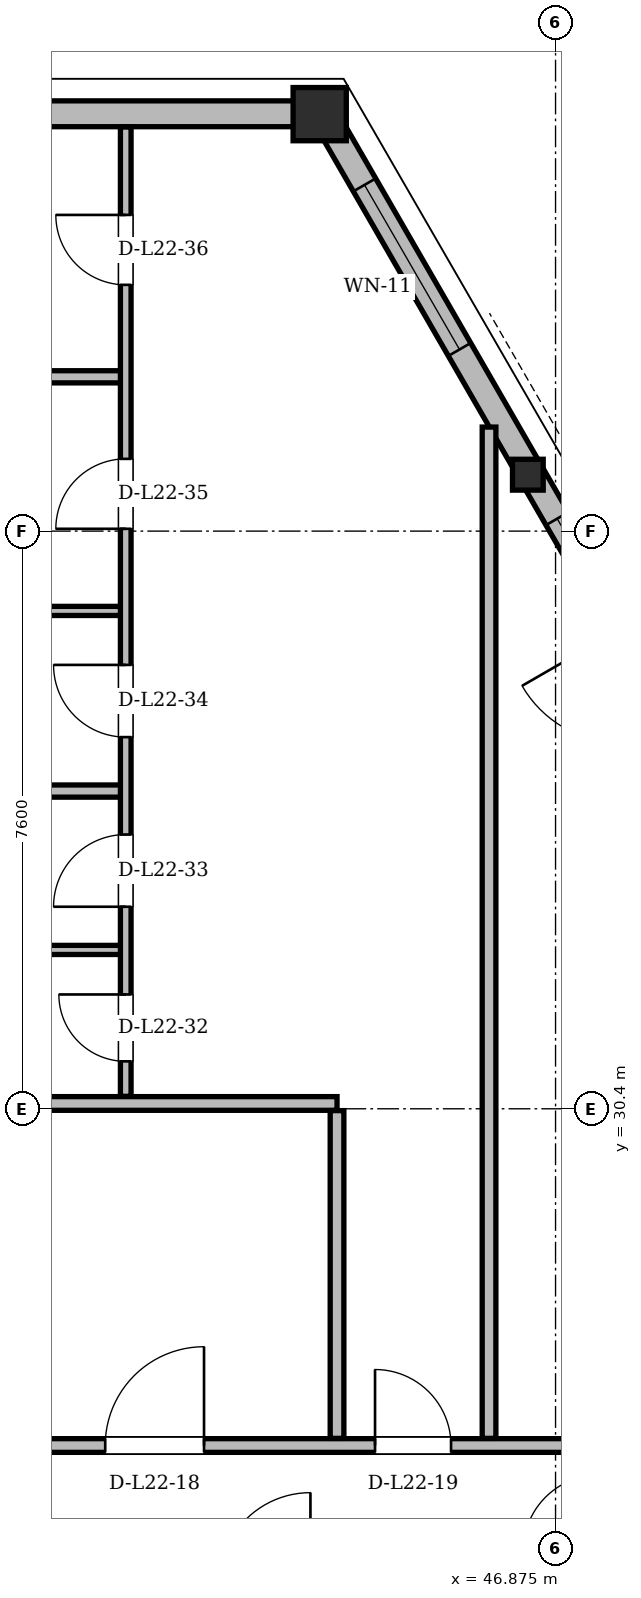
"""IFC4 building model, lengths in metres.
Left out: names, types, materials, properties, quantities, classifications, styles, units other than length and angle.
Written with IfcOpenShell. Run it as: python <this file> out.ifc"""

import sys

from ifc_helpers import new_model, si_unit, direction, frame, frame_2d, origin, origin_2d, place, context, subcontext, project, spatial, rectangle, hollow_rectangle, i_section, extrude, element, fill, save


model = new_model("IFC4")
c1 = context("Model", 3, precision=1e-05, world=origin(), true_north=direction((0.0, 1.0)))
c2 = subcontext(c1, "Body", "Model", "MODEL_VIEW")
j1 = project(units=[si_unit("LENGTHUNIT", "METRE"), si_unit("PLANEANGLEUNIT", "RADIAN")], contexts=[c1])
p1 = place(None, origin())
s1 = spatial("IfcSite", under=j1, at=p1, CompositionType="ELEMENT")
p2 = place(p1, origin())
s2 = spatial("IfcBuilding", under=s1, at=p2, CompositionType="ELEMENT")
p3 = place(p2, frame((0.0, 0.0, 86.1)))
s3 = spatial("IfcBuildingStorey", under=s2, at=p3, CompositionType="ELEMENT", Elevation=86.1)
p4 = place(p3, frame((43.821, 43.49, 0.004), z_axis=(-0.027523634775, -0.002650424089, 0.999617639291), x_axis=(0.095852900965, -0.995395510024, 0.0)))
e1 = element("IfcColumn", 1, at=p4, inside=s3, PredefinedType="COLUMN", context=c2, shape_type="SweptSolid", body=[
    extrude(hollow_rectangle(XDim=0.7, YDim=0.7, WallThickness=0.055, at=origin_2d()), origin(), (0.0, 0.0, 1.0), 3.593),
])
p5 = place(p3, frame((46.557, 38.753, 0.004), z_axis=(-0.025621714131, -0.005844741155, 0.999654623741), x_axis=(0.222403463218, -0.974954716666, 0.0)))
e2 = element("IfcColumn", 2, at=p5, inside=s3, PredefinedType="COLUMN", context=c2, shape_type="SweptSolid", body=[
    extrude(i_section(OverallWidth=0.404, OverallDepth=0.406, WebThickness=0.027, FlangeThickness=0.044, at=origin_2d()), origin(), (0.0, 0.0, 1.0), 3.592),
])
p6 = place(p3, frame((60.917, 13.879, 0.0), z_axis=(0.0, 0.0, 1.0), x_axis=(-0.49999956034, 0.866025657622, 0.0)))
e3 = element("IfcWall", 3, at=p6, inside=s3, PredefinedType="SOLIDWALL", context=c2, shape_type="SweptSolid", body=[
    extrude(rectangle(XDim=34.192, YDim=0.34, at=frame_2d((17.096, 0.0))), origin(), (0.0, 0.0, 1.0), 2.578),
])
p7 = place(p6, frame((6.579, 0.0, 0.0)))
e4 = element("IfcOpeningElement", 4, at=p7, cuts=e3, PredefinedType="OPENING", context=c2, shape_type="SweptSolid", body=[
    extrude(rectangle(XDim=1.5, YDim=2.2, at=frame_2d((0.75, 1.1))), frame((0.0, 0.17, 0.0), z_axis=(0.0, -1.0, 0.0), x_axis=(1.0, 0.0, 0.0)), (0.0, 0.0, 1.0), 0.34),
])
p8 = place(p6, frame((24.868, 0.0, 0.0)))
e5 = element("IfcOpeningElement", 5, at=p8, cuts=e3, PredefinedType="OPENING", context=c2, shape_type="SweptSolid", body=[
    extrude(rectangle(XDim=1.5, YDim=2.2, at=frame_2d((0.75, 1.1))), frame((0.0, 0.17, 0.0), z_axis=(0.0, -1.0, 0.0), x_axis=(1.0, 0.0, 0.0)), (0.0, 0.0, 1.0), 0.34),
])
p9 = place(p6, frame((1.584, 0.0, 0.85)))
e6 = element("IfcOpeningElement", 6, at=p9, cuts=e3, PredefinedType="OPENING", context=c2, shape_type="SweptSolid", body=[
    extrude(rectangle(XDim=1.2, YDim=1.48, at=frame_2d((0.6, 0.74))), frame((0.0, 0.17, 0.0), z_axis=(0.0, -1.0, 0.0), x_axis=(1.0, 0.0, 0.0)), (0.0, 0.0, 1.0), 0.34),
])
p10 = place(p6, frame((30.611, 0.0, 0.85)))
e7 = element("IfcOpeningElement", 7, at=p10, cuts=e3, PredefinedType="OPENING", context=c2, shape_type="SweptSolid", body=[
    extrude(rectangle(XDim=2.5, YDim=1.618, at=frame_2d((1.25, 0.809))), frame((0.0, 0.17, 0.0), z_axis=(0.0, -1.0, 0.0), x_axis=(1.0, 0.0, 0.0)), (0.0, 0.0, 1.0), 0.34),
])
p11 = place(p6, frame((20.17, 0.0, 0.85)))
e8 = element("IfcOpeningElement", 8, at=p11, cuts=e3, PredefinedType="OPENING", context=c2, shape_type="SweptSolid", body=[
    extrude(rectangle(XDim=2.4, YDim=1.618, at=frame_2d((1.2, 0.809))), frame((0.0, 0.17, 0.0), z_axis=(0.0, -1.0, 0.0), x_axis=(1.0, 0.0, 0.0)), (0.0, 0.0, 1.0), 0.34),
])
p12 = place(p6, frame((26.841, 0.0, 0.85)))
e9 = element("IfcOpeningElement", 9, at=p12, cuts=e3, PredefinedType="OPENING", context=c2, shape_type="SweptSolid", body=[
    extrude(rectangle(XDim=1.2, YDim=1.48, at=frame_2d((0.6, 0.74))), frame((0.0, 0.17, 0.0), z_axis=(0.0, -1.0, 0.0), x_axis=(1.0, 0.0, 0.0)), (0.0, 0.0, 1.0), 0.34),
])
p13 = place(p6, frame((15.279, 0.0, 0.85)))
e10 = element("IfcOpeningElement", 10, at=p13, cuts=e3, PredefinedType="OPENING", context=c2, shape_type="SweptSolid", body=[
    extrude(rectangle(XDim=1.2, YDim=1.48, at=frame_2d((0.6, 0.74))), frame((0.0, 0.17, 0.0), z_axis=(0.0, -1.0, 0.0), x_axis=(1.0, 0.0, 0.0)), (0.0, 0.0, 1.0), 0.34),
])
p14 = place(p6, frame((17.873, 0.0, 0.85)))
e11 = element("IfcOpeningElement", 11, at=p14, cuts=e3, PredefinedType="OPENING", context=c2, shape_type="SweptSolid", body=[
    extrude(rectangle(XDim=1.2, YDim=1.48, at=frame_2d((0.6, 0.74))), frame((0.0, 0.17, 0.0), z_axis=(0.0, -1.0, 0.0), x_axis=(1.0, 0.0, 0.0)), (0.0, 0.0, 1.0), 0.34),
])
p15 = place(p3, frame((43.821, 43.49, 0.0), z_axis=(0.0, 0.0, 1.0), x_axis=(-1.0, 0.0, 0.0)))
e12 = element("IfcWall", 12, at=p15, inside=s3, PredefinedType="SOLIDWALL", context=c2, shape_type="SweptSolid", body=[
    extrude(rectangle(XDim=12.643, YDim=0.34, at=frame_2d((6.321, 0.0))), origin(), (0.0, 0.0, 1.0), 2.578),
])
p16 = place(p15, frame((4.799, 0.0, 0.85)))
e13 = element("IfcOpeningElement", 13, at=p16, cuts=e12, PredefinedType="OPENING", context=c2, shape_type="SweptSolid", body=[
    extrude(rectangle(XDim=0.9, YDim=1.15, at=frame_2d((0.45, 0.575))), frame((0.0, 0.17, 0.0), z_axis=(0.0, -1.0, 0.0), x_axis=(1.0, 0.0, 0.0)), (0.0, 0.0, 1.0), 0.34),
])
p17 = place(p3, frame((27.55, 25.97, 0.0), z_axis=(0.0, 0.0, 1.0), x_axis=(1.0, 0.0, 0.0)))
e14 = element("IfcWall", 14, at=p17, inside=s3, PredefinedType="PARTITIONING", context=c2, shape_type="SweptSolid", body=[
    extrude(rectangle(XDim=19.9, YDim=0.18, at=frame_2d((9.95, 0.0))), origin(), (0.0, 0.0, 1.0), 2.814),
])
p18 = place(p17, frame((0.425, 0.0, 0.0)))
e15 = element("IfcOpeningElement", 15, at=p18, cuts=e14, PredefinedType="OPENING", context=c2, shape_type="SweptSolid", body=[
    extrude(rectangle(XDim=1.0, YDim=2.18, at=frame_2d((0.5, 1.09))), frame((0.0, 0.09, 0.0), z_axis=(0.0, -1.0, 0.0), x_axis=(1.0, 0.0, 0.0)), (0.0, 0.0, 1.0), 0.18),
])
p19 = place(p17, frame((4.222, 0.0, 0.0)))
e16 = element("IfcOpeningElement", 16, at=p19, cuts=e14, PredefinedType="OPENING", context=c2, shape_type="SweptSolid", body=[
    extrude(rectangle(XDim=1.0, YDim=2.18, at=frame_2d((0.5, 1.09))), frame((0.0, 0.09, 0.0), z_axis=(0.0, -1.0, 0.0), x_axis=(1.0, 0.0, 0.0)), (0.0, 0.0, 1.0), 0.18),
])
p20 = place(p17, frame((13.4, 0.0, 0.0)))
e17 = element("IfcOpeningElement", 17, at=p20, cuts=e14, PredefinedType="OPENING", context=c2, shape_type="SweptSolid", body=[
    extrude(rectangle(XDim=1.3, YDim=2.2, at=frame_2d((0.65, 1.1))), frame((0.0, 0.09, 0.0), z_axis=(0.0, -1.0, 0.0), x_axis=(1.0, 0.0, 0.0)), (0.0, 0.0, 1.0), 0.18),
])
p21 = place(p17, frame((16.95, 0.0, 0.0)))
e18 = element("IfcOpeningElement", 18, at=p21, cuts=e14, PredefinedType="OPENING", context=c2, shape_type="SweptSolid", body=[
    extrude(rectangle(XDim=1.0, YDim=2.18, at=frame_2d((0.5, 1.09))), frame((0.0, 0.09, 0.0), z_axis=(0.0, -1.0, 0.0), x_axis=(1.0, 0.0, 0.0)), (0.0, 0.0, 1.0), 0.18),
])
p22 = place(p3, frame((39.2, 30.47, 0.0), z_axis=(0.0, 0.0, 1.0), x_axis=(1.0, 0.0, 0.0)))
e19 = element("IfcWall", 19, at=p22, inside=s3, PredefinedType="PARTITIONING", context=c2, shape_type="SweptSolid", body=[
    extrude(rectangle(XDim=4.8, YDim=0.18, at=frame_2d((2.4, 0.0))), origin(), (0.0, 0.0, 1.0), 3.36),
])
p23 = place(p3, frame((37.95, 32.49, 0.0), z_axis=(0.0, 0.0, 1.0), x_axis=(1.0, 0.0, 0.0)))
e20 = element("IfcWall", 20, at=p23, inside=s3, PredefinedType="PARTITIONING", context=c2, shape_type="SweptSolid", body=[
    extrude(rectangle(XDim=3.27, YDim=0.12, at=frame_2d((1.635, 0.0))), origin(), (0.0, 0.0, 1.0), 3.36),
])
p24 = place(p3, frame((37.95, 34.58, 0.0), z_axis=(0.0, 0.0, 1.0), x_axis=(1.0, 0.0, 0.0)))
e21 = element("IfcWall", 21, at=p24, inside=s3, PredefinedType="PARTITIONING", context=c2, shape_type="SweptSolid", body=[
    extrude(rectangle(XDim=3.27, YDim=0.16, at=frame_2d((1.635, 0.0))), origin(), (0.0, 0.0, 1.0), 3.36),
])
p25 = place(p3, frame((37.95, 36.95, 0.0), z_axis=(0.0, 0.0, 1.0), x_axis=(1.0, 0.0, 0.0)))
e22 = element("IfcWall", 22, at=p25, inside=s3, PredefinedType="PARTITIONING", context=c2, shape_type="SweptSolid", body=[
    extrude(rectangle(XDim=3.27, YDim=0.12, at=frame_2d((1.635, 0.0))), origin(), (0.0, 0.0, 1.0), 3.36),
])
p26 = place(p3, frame((37.95, 40.03, 0.0), z_axis=(0.0, 0.0, 1.0), x_axis=(1.0, 0.0, 0.0)))
e23 = element("IfcWall", 23, at=p26, inside=s3, PredefinedType="PARTITIONING", context=c2, shape_type="SweptSolid", body=[
    extrude(rectangle(XDim=3.27, YDim=0.16, at=frame_2d((1.635, 0.0))), origin(), (0.0, 0.0, 1.0), 3.36),
])
p27 = place(p3, frame((41.22, 30.564, 0.0), z_axis=(0.0, 0.0, 1.0), x_axis=(0.0, 1.0, 0.0)))
e24 = element("IfcWall", 24, at=p27, inside=s3, PredefinedType="PARTITIONING", context=c2, shape_type="SweptSolid", body=[
    extrude(rectangle(XDim=12.752, YDim=0.14, at=frame_2d((6.376, 0.0))), origin(), (0.0, 0.0, 1.0), 3.36),
])
p28 = place(p27, frame((0.46, 0.0, 0.0)))
e25 = element("IfcOpeningElement", 25, at=p28, cuts=e24, PredefinedType="OPENING", context=c2, shape_type="SweptSolid", body=[
    extrude(rectangle(XDim=0.88, YDim=2.08, at=frame_2d((0.44, 1.04))), frame((0.0, 0.07, 0.0), z_axis=(0.0, -1.0, 0.0), x_axis=(1.0, 0.0, 0.0)), (0.0, 0.0, 1.0), 0.14),
])
p29 = place(p27, frame((2.494, 0.0, 0.0)))
e26 = element("IfcOpeningElement", 26, at=p29, cuts=e24, PredefinedType="OPENING", context=c2, shape_type="SweptSolid", body=[
    extrude(rectangle(XDim=0.95, YDim=2.1, at=frame_2d((0.475, 1.05))), frame((0.0, 0.07, 0.0), z_axis=(0.0, -1.0, 0.0), x_axis=(1.0, 0.0, 0.0)), (0.0, 0.0, 1.0), 0.14),
])
p30 = place(p27, frame((4.726, 0.0, 0.0)))
e27 = element("IfcOpeningElement", 27, at=p30, cuts=e24, PredefinedType="OPENING", context=c2, shape_type="SweptSolid", body=[
    extrude(rectangle(XDim=0.95, YDim=2.1, at=frame_2d((0.475, 1.05))), frame((0.0, 0.07, 0.0), z_axis=(0.0, -1.0, 0.0), x_axis=(1.0, 0.0, 0.0)), (0.0, 0.0, 1.0), 0.14),
])
p31 = place(p27, frame((7.467, 0.0, 0.0)))
e28 = element("IfcOpeningElement", 28, at=p31, cuts=e24, PredefinedType="OPENING", context=c2, shape_type="SweptSolid", body=[
    extrude(rectangle(XDim=0.92, YDim=2.12, at=frame_2d((0.46, 1.06))), frame((0.0, 0.07, 0.0), z_axis=(0.0, -1.0, 0.0), x_axis=(1.0, 0.0, 0.0)), (0.0, 0.0, 1.0), 0.14),
])
p32 = place(p27, frame((10.676, 0.0, 0.0)))
e29 = element("IfcOpeningElement", 29, at=p32, cuts=e24, PredefinedType="OPENING", context=c2, shape_type="SweptSolid", body=[
    extrude(rectangle(XDim=0.92, YDim=2.12, at=frame_2d((0.46, 1.06))), frame((0.0, 0.07, 0.0), z_axis=(0.0, -1.0, 0.0), x_axis=(1.0, 0.0, 0.0)), (0.0, 0.0, 1.0), 0.14),
])
p33 = place(p3, frame((44.0, 26.064, 0.0), z_axis=(0.0, 0.0, 1.0), x_axis=(0.0, 1.0, 0.0)))
e30 = element("IfcWall", 30, at=p33, inside=s3, PredefinedType="PARTITIONING", context=c2, shape_type="SweptSolid", body=[
    extrude(rectangle(XDim=4.312, YDim=0.18, at=frame_2d((2.156, 0.0))), origin(), (0.0, 0.0, 1.0), 2.946),
])
p34 = place(p3, frame((46.0, 26.064, 0.0), z_axis=(0.0, 0.0, 1.0), x_axis=(0.0, 1.0, 0.0)))
e31 = element("IfcWall", 31, at=p34, inside=s3, PredefinedType="PARTITIONING", context=c2, shape_type="SweptSolid", body=[
    extrude(rectangle(XDim=13.305, YDim=0.18, at=frame_2d((6.652, 0.0))), origin(), (0.0, 0.0, 1.0), 2.578),
])
p35 = place(p10, origin())
e32 = element("IfcWindow", 32, at=p35, inside=s3, PartitioningType="SINGLE_PANEL", PredefinedType="WINDOW", context=c2, shape_type="SweptSolid", body=[
    extrude(rectangle(XDim=2.5, YDim=1.618, at=frame_2d((1.25, 0.809))), frame((0.0, 0.03, 0.0), z_axis=(0.0, -1.0, 0.0), x_axis=(1.0, 0.0, 0.0)), (0.0, 0.0, 1.0), 0.06),
])
fill(e7, e32)
p36 = place(p12, origin())
e33 = element("IfcWindow", 33, at=p36, inside=s3, PartitioningType="SINGLE_PANEL", PredefinedType="WINDOW", context=c2, shape_type="SweptSolid", body=[
    extrude(rectangle(XDim=1.2, YDim=1.48, at=frame_2d((0.6, 0.74))), frame((0.0, 0.03, 0.0), z_axis=(0.0, -1.0, 0.0), x_axis=(1.0, 0.0, 0.0)), (0.0, 0.0, 1.0), 0.06),
])
fill(e9, e33)
p37 = place(p20, origin())
e34 = element("IfcDoor", 34, at=p37, inside=s3, OperationType="SINGLE_SWING_RIGHT", PredefinedType="DOOR", context=c2, shape_type="SweptSolid", body=[
    extrude(rectangle(XDim=1.3, YDim=2.2, at=frame_2d((0.65, 1.1))), frame((0.0, 0.025, 0.0), z_axis=(0.0, -1.0, 0.0), x_axis=(1.0, 0.0, 0.0)), (0.0, 0.0, 1.0), 0.05),
])
fill(e17, e34)
p38 = place(p21, origin())
e35 = element("IfcDoor", 35, at=p38, inside=s3, OperationType="SINGLE_SWING_LEFT", PredefinedType="DOOR", context=c2, shape_type="SweptSolid", body=[
    extrude(rectangle(XDim=1.0, YDim=2.18, at=frame_2d((0.5, 1.09))), frame((0.0, 0.025, 0.0), z_axis=(0.0, -1.0, 0.0), x_axis=(1.0, 0.0, 0.0)), (0.0, 0.0, 1.0), 0.05),
])
fill(e18, e35)
p39 = place(p28, origin())
e36 = element("IfcDoor", 36, at=p39, inside=s3, OperationType="SINGLE_SWING_RIGHT", PredefinedType="DOOR", context=c2, shape_type="SweptSolid", body=[
    extrude(rectangle(XDim=0.88, YDim=2.08, at=frame_2d((0.44, 1.04))), frame((0.0, 0.025, 0.0), z_axis=(0.0, -1.0, 0.0), x_axis=(1.0, 0.0, 0.0)), (0.0, 0.0, 1.0), 0.05),
])
fill(e25, e36)
p40 = place(p29, origin())
e37 = element("IfcDoor", 37, at=p40, inside=s3, OperationType="SINGLE_SWING_LEFT", PredefinedType="DOOR", context=c2, shape_type="SweptSolid", body=[
    extrude(rectangle(XDim=0.95, YDim=2.1, at=frame_2d((0.475, 1.05))), frame((0.0, 0.025, 0.0), z_axis=(0.0, -1.0, 0.0), x_axis=(1.0, 0.0, 0.0)), (0.0, 0.0, 1.0), 0.05),
])
fill(e26, e37)
p41 = place(p30, origin())
e38 = element("IfcDoor", 38, at=p41, inside=s3, OperationType="SINGLE_SWING_RIGHT", PredefinedType="DOOR", context=c2, shape_type="SweptSolid", body=[
    extrude(rectangle(XDim=0.95, YDim=2.1, at=frame_2d((0.475, 1.05))), frame((0.0, 0.025, 0.0), z_axis=(0.0, -1.0, 0.0), x_axis=(1.0, 0.0, 0.0)), (0.0, 0.0, 1.0), 0.05),
])
fill(e27, e38)
p42 = place(p31, origin())
e39 = element("IfcDoor", 39, at=p42, inside=s3, OperationType="SINGLE_SWING_LEFT", PredefinedType="DOOR", context=c2, shape_type="SweptSolid", body=[
    extrude(rectangle(XDim=0.92, YDim=2.12, at=frame_2d((0.46, 1.06))), frame((0.0, 0.025, 0.0), z_axis=(0.0, -1.0, 0.0), x_axis=(1.0, 0.0, 0.0)), (0.0, 0.0, 1.0), 0.05),
])
fill(e28, e39)
p43 = place(p32, origin())
e40 = element("IfcDoor", 40, at=p43, inside=s3, OperationType="SINGLE_SWING_RIGHT", PredefinedType="DOOR", context=c2, shape_type="SweptSolid", body=[
    extrude(rectangle(XDim=0.92, YDim=2.12, at=frame_2d((0.46, 1.06))), frame((0.0, 0.025, 0.0), z_axis=(0.0, -1.0, 0.0), x_axis=(1.0, 0.0, 0.0)), (0.0, 0.0, 1.0), 0.05),
])
fill(e29, e40)
save(model, sys.argv[1])
